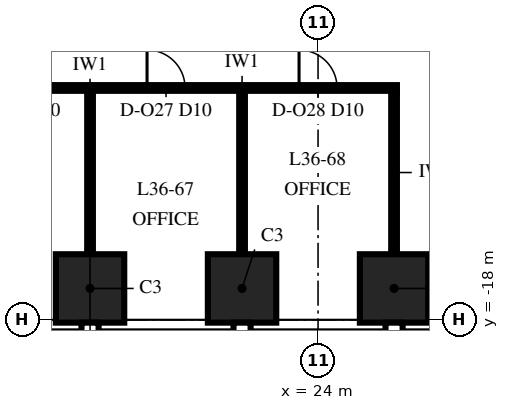
"""IFC4 building model, lengths in metres.
Left out: names, types, materials, properties, quantities, classifications, styles, units other than length and angle.
Written with IfcOpenShell. Run it as: python <this file> out.ifc"""

import sys

from ifc_helpers import new_model, si_unit, direction, frame, frame_2d, origin, origin_2d, place, context, subcontext, project, spatial, rectangle, extrude, element, fill, save


model = new_model("IFC4")
c1 = context("Model", 3, precision=1e-05, world=origin(), true_north=direction((0.0, 1.0)))
c2 = subcontext(c1, "Body", "Model", "MODEL_VIEW")
j1 = project(units=[si_unit("LENGTHUNIT", "METRE"), si_unit("PLANEANGLEUNIT", "RADIAN")], contexts=[c1])
p1 = place(None, origin())
s1 = spatial("IfcSite", under=j1, at=p1, CompositionType="ELEMENT")
p2 = place(p1, origin())
s2 = spatial("IfcBuilding", under=s1, at=p2, CompositionType="ELEMENT")
p3 = place(p2, frame((0.0, 0.0, 159.0)))
s3 = spatial("IfcBuildingStorey", under=s2, at=p3, CompositionType="ELEMENT", Elevation=159.0)
for number, where, z_axis, x_axis in (
    (1, (18.0, -17.175, 0.0), (0.0, 0.0, 1.0), (1.0, 0.0, 0.0)),
    (2, (22.0, -17.175, 0.0), (0.0, 0.0, 1.0), (1.0, 0.0, 0.0)),
    (3, (26.0, -17.175, 0.0), (0.0, 0.0, 1.0), (1.0, 0.0, 0.0)),
):
    element("IfcColumn", number, at=place(p3, frame(where, z_axis=z_axis, x_axis=x_axis)), inside=s3, PredefinedType="COLUMN", context=c2, shape_type="SweptSolid", body=[
        extrude(rectangle(XDim=1.8, YDim=1.8, at=origin_2d()), origin(), (0.0, 0.0, 1.0), 4.0),
    ])
p4 = place(p3, frame((9.925, -11.9, 0.0), z_axis=(0.0, 0.0, 1.0), x_axis=(1.0, 0.0, 0.0)))
e4 = element("IfcWall", 4, at=p4, inside=s3, PredefinedType="PARTITIONING", context=c2, shape_type="SweptSolid", body=[
    extrude(rectangle(XDim=16.15, YDim=0.15, at=frame_2d((8.075, 0.0))), origin(), (0.0, 0.0, 1.0), 3.25),
])
p5 = place(p4, frame((1.575, 0.0, 0.0)))
e5 = element("IfcOpeningElement", 5, at=p5, cuts=e4, PredefinedType="OPENING", context=c2, shape_type="SweptSolid", body=[
    extrude(rectangle(XDim=1.0, YDim=2.3, at=frame_2d((0.5, 1.15))), frame((0.0, 0.09, 0.0), z_axis=(0.0, -1.0, 0.0), x_axis=(1.0, 0.0, 0.0)), (0.0, 0.0, 1.0), 0.18),
])
p6 = place(p4, frame((5.575, 0.0, 0.0)))
e6 = element("IfcOpeningElement", 6, at=p6, cuts=e4, PredefinedType="OPENING", context=c2, shape_type="SweptSolid", body=[
    extrude(rectangle(XDim=1.0, YDim=2.3, at=frame_2d((0.5, 1.15))), frame((0.0, 0.09, 0.0), z_axis=(0.0, -1.0, 0.0), x_axis=(1.0, 0.0, 0.0)), (0.0, 0.0, 1.0), 0.18),
])
p7 = place(p4, frame((9.575, 0.0, 0.0)))
e7 = element("IfcOpeningElement", 7, at=p7, cuts=e4, PredefinedType="OPENING", context=c2, shape_type="SweptSolid", body=[
    extrude(rectangle(XDim=1.0, YDim=2.3, at=frame_2d((0.5, 1.15))), frame((0.0, 0.09, 0.0), z_axis=(0.0, -1.0, 0.0), x_axis=(1.0, 0.0, 0.0)), (0.0, 0.0, 1.0), 0.18),
])
p8 = place(p4, frame((13.575, 0.0, 0.0)))
e8 = element("IfcOpeningElement", 8, at=p8, cuts=e4, PredefinedType="OPENING", context=c2, shape_type="SweptSolid", body=[
    extrude(rectangle(XDim=1.0, YDim=2.3, at=frame_2d((0.5, 1.15))), frame((0.0, 0.09, 0.0), z_axis=(0.0, -1.0, 0.0), x_axis=(1.0, 0.0, 0.0)), (0.0, 0.0, 1.0), 0.18),
])
for number, where, z_axis, x_axis in (
    (9, (18.0, -16.275, 0.0), (0.0, 0.0, 1.0), (0.0, 1.0, 0.0)),
    (10, (22.0, -16.275, 0.0), (0.0, 0.0, 1.0), (0.0, 1.0, 0.0)),
    (11, (26.0, -16.275, 0.0), (0.0, 0.0, 1.0), (0.0, 1.0, 0.0)),
):
    element("IfcWall", number, at=place(p3, frame(where, z_axis=z_axis, x_axis=x_axis)), inside=s3, PredefinedType="PARTITIONING", context=c2, shape_type="SweptSolid", body=[
        extrude(rectangle(XDim=4.3, YDim=0.15, at=frame_2d((2.15, 0.0))), origin(), (0.0, 0.0, 1.0), 3.25),
    ])
p9 = place(p7, origin())
e12 = element("IfcDoor", 12, at=p9, inside=s3, OperationType="SINGLE_SWING_LEFT", PredefinedType="DOOR", context=c2, shape_type="SweptSolid", body=[
    extrude(rectangle(XDim=1.0, YDim=2.3, at=frame_2d((0.5, 1.15))), frame((0.0, 0.075, 0.0), z_axis=(0.0, -1.0, 0.0), x_axis=(1.0, 0.0, 0.0)), (0.0, 0.0, 1.0), 0.149),
])
fill(e7, e12)
p10 = place(p8, origin())
e13 = element("IfcDoor", 13, at=p10, inside=s3, OperationType="SINGLE_SWING_LEFT", PredefinedType="DOOR", context=c2, shape_type="SweptSolid", body=[
    extrude(rectangle(XDim=1.0, YDim=2.3, at=frame_2d((0.5, 1.15))), frame((0.0, 0.075, 0.0), z_axis=(0.0, -1.0, 0.0), x_axis=(1.0, 0.0, 0.0)), (0.0, 0.0, 1.0), 0.149),
])
fill(e8, e13)
save(model, sys.argv[1])
